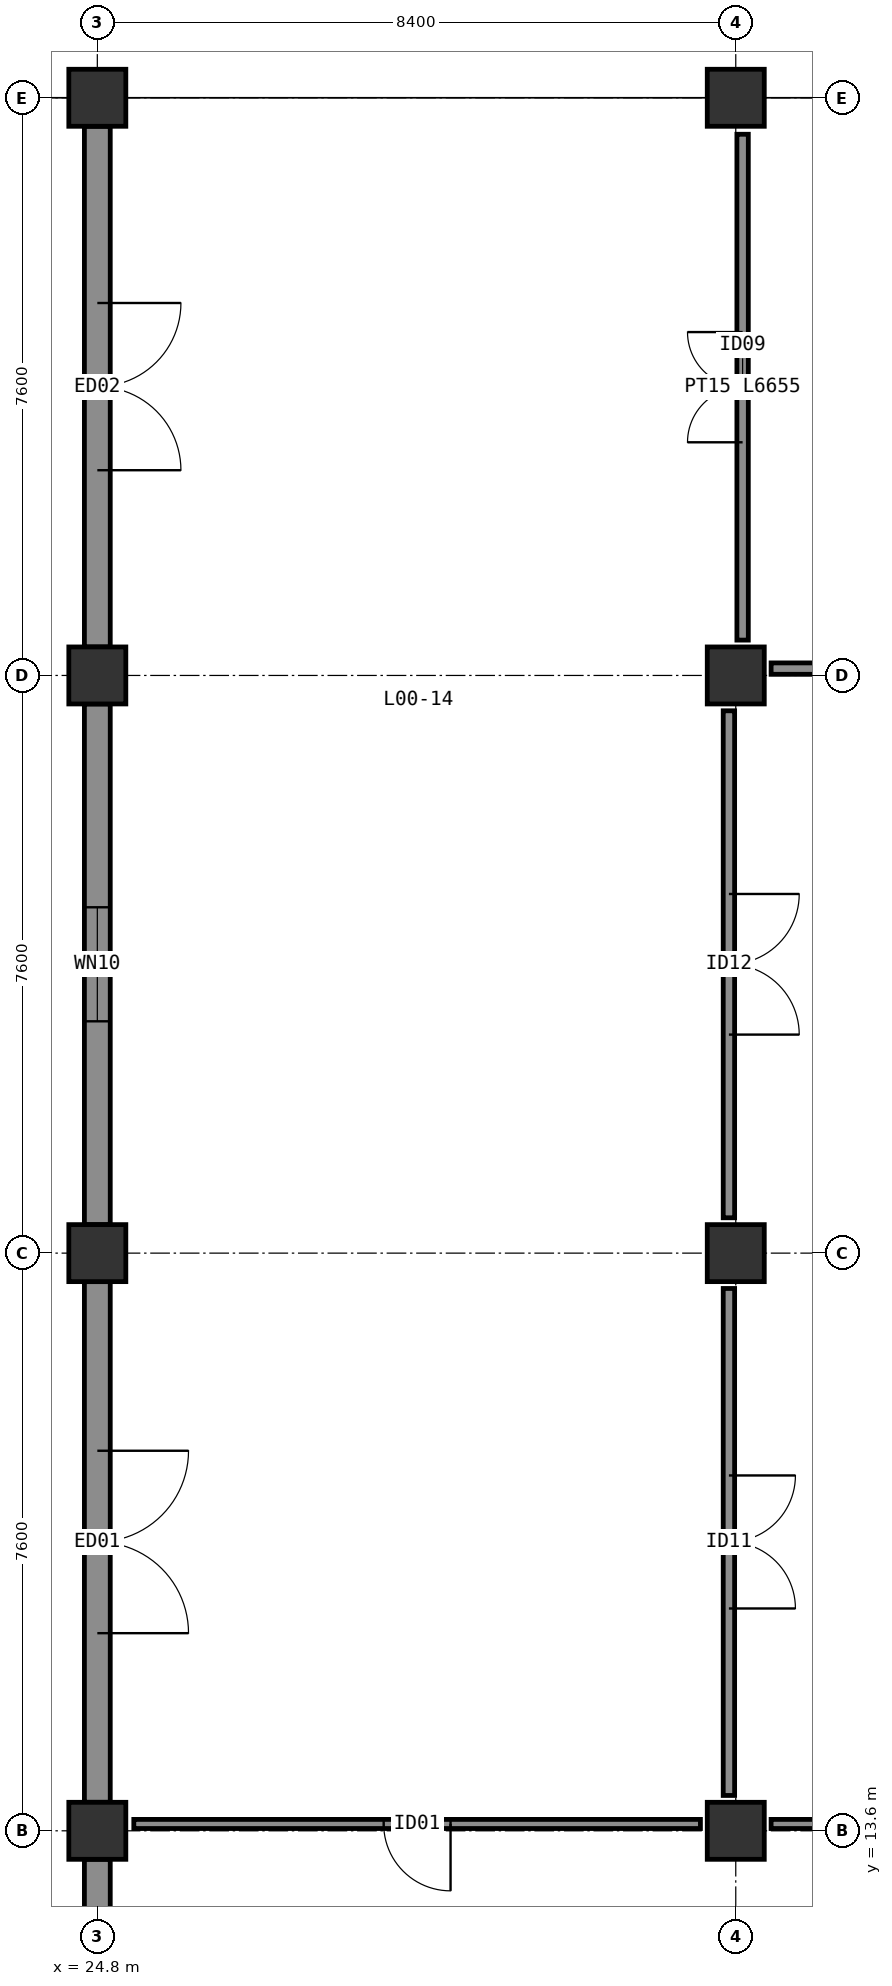
"""IFC4 building model, lengths in metres.
Left out: names, types, materials, properties, quantities, classifications, styles, units other than length and angle.
Written with IfcOpenShell. Run it as: python <this file> out.ifc"""

import sys

from ifc_helpers import new_model, si_unit, direction, frame, frame_2d, origin, origin_2d, place, context, subcontext, project, spatial, rectangle, extrude, element, fill, save


model = new_model("IFC4")
c1 = context("Model", 3, precision=1e-05, world=origin(), true_north=direction((0.0, 1.0)))
c2 = subcontext(c1, "Body", "Model", "MODEL_VIEW")
j1 = project(units=[si_unit("LENGTHUNIT", "METRE"), si_unit("PLANEANGLEUNIT", "RADIAN")], contexts=[c1])
p1 = place(None, origin())
s1 = spatial("IfcSite", under=j1, at=p1, CompositionType="ELEMENT")
p2 = place(p1, origin())
s2 = spatial("IfcBuilding", under=s1, at=p2, CompositionType="ELEMENT")
p3 = place(p2, origin())
s3 = spatial("IfcBuildingStorey", under=s2, at=p3, CompositionType="ELEMENT", Elevation=0.0)
for number, where, z_axis, x_axis in (
    (1, (24.8, 13.6, 0.0), (0.0, 0.0, 1.0), (1.0, 0.0, 0.0)),
    (2, (33.2, 13.6, 0.0), (0.0, 0.0, 1.0), (1.0, 0.0, 0.0)),
    (3, (24.8, 21.2, 0.0), (0.0, 0.0, 1.0), (1.0, 0.0, 0.0)),
    (4, (33.2, 21.2, 0.0), (0.0, 0.0, 1.0), (1.0, 0.0, 0.0)),
    (5, (24.8, 28.8, 0.0), (0.0, 0.0, 1.0), (1.0, 0.0, 0.0)),
    (6, (33.2, 28.8, 0.0), (0.0, 0.0, 1.0), (1.0, 0.0, 0.0)),
    (7, (24.8, 36.4, 0.0), (0.0, 0.0, 1.0), (1.0, 0.0, 0.0)),
    (8, (33.2, 36.4, 0.0), (0.0, 0.0, 1.0), (1.0, 0.0, 0.0)),
):
    element("IfcColumn", number, at=place(p3, frame(where, z_axis=z_axis, x_axis=x_axis)), inside=s3, PredefinedType="COLUMN", context=c2, shape_type="SweptSolid", body=[
        extrude(rectangle(XDim=0.75, YDim=0.75, at=origin_2d()), origin(), (0.0, 0.0, 1.0), 4.8),
    ])
p4 = place(p3, frame((24.8, 36.025, 0.0), z_axis=(0.0, 0.0, 1.0), x_axis=(0.0, -1.0, 0.0)))
e9 = element("IfcWall", 9, at=p4, inside=s3, PredefinedType="SOLIDWALL", context=c2, shape_type="SweptSolid", body=[
    extrude(rectangle(XDim=6.85, YDim=0.34, at=frame_2d((3.425, 0.0))), origin(), (0.0, 0.0, 1.0), 4.5),
])
p5 = place(p4, frame((2.325, 0.0, 0.0)))
e10 = element("IfcOpeningElement", 10, at=p5, cuts=e9, PredefinedType="OPENING", context=c2, shape_type="SweptSolid", body=[
    extrude(rectangle(XDim=2.2, YDim=2.4, at=frame_2d((1.1, 1.2))), frame((0.0, 0.18, 0.0), z_axis=(0.0, -1.0, 0.0), x_axis=(1.0, 0.0, 0.0)), (0.0, 0.0, 1.0), 0.36),
])
p6 = place(p3, frame((24.8, 28.425, 0.0), z_axis=(0.0, 0.0, 1.0), x_axis=(0.0, -1.0, 0.0)))
e11 = element("IfcWall", 11, at=p6, inside=s3, PredefinedType="SOLIDWALL", context=c2, shape_type="SweptSolid", body=[
    extrude(rectangle(XDim=6.85, YDim=0.34, at=frame_2d((3.425, 0.0))), origin(), (0.0, 0.0, 1.0), 4.5),
])
p7 = place(p6, frame((2.675, 0.0, 0.95)))
e12 = element("IfcOpeningElement", 12, at=p7, cuts=e11, PredefinedType="OPENING", context=c2, shape_type="SweptSolid", body=[
    extrude(rectangle(XDim=1.5, YDim=1.8, at=frame_2d((0.75, 0.9))), frame((0.0, 0.18, 0.0), z_axis=(0.0, -1.0, 0.0), x_axis=(1.0, 0.0, 0.0)), (0.0, 0.0, 1.0), 0.36),
])
p8 = place(p3, frame((24.8, 20.825, 0.0), z_axis=(0.0, 0.0, 1.0), x_axis=(0.0, -1.0, 0.0)))
e13 = element("IfcWall", 13, at=p8, inside=s3, PredefinedType="SOLIDWALL", context=c2, shape_type="SweptSolid", body=[
    extrude(rectangle(XDim=6.85, YDim=0.34, at=frame_2d((3.425, 0.0))), origin(), (0.0, 0.0, 1.0), 4.5),
])
p9 = place(p8, frame((2.225, 0.0, 0.0)))
e14 = element("IfcOpeningElement", 14, at=p9, cuts=e13, PredefinedType="OPENING", context=c2, shape_type="SweptSolid", body=[
    extrude(rectangle(XDim=2.4, YDim=2.4, at=frame_2d((1.2, 1.2))), frame((0.0, 0.18, 0.0), z_axis=(0.0, -1.0, 0.0), x_axis=(1.0, 0.0, 0.0)), (0.0, 0.0, 1.0), 0.36),
])
p10 = place(p3, frame((24.8, 13.225, 0.0), z_axis=(0.0, 0.0, 1.0), x_axis=(0.0, -1.0, 0.0)))
e15 = element("IfcWall", 15, at=p10, inside=s3, PredefinedType="SOLIDWALL", context=c2, shape_type="SweptSolid", body=[
    extrude(rectangle(XDim=6.775, YDim=0.34, at=frame_2d((3.388, 0.0))), origin(), (0.0, 0.0, 1.0), 4.5),
])
p11 = place(p10, frame((2.387, 0.0, 0.0)))
e16 = element("IfcOpeningElement", 16, at=p11, cuts=e15, PredefinedType="OPENING", context=c2, shape_type="SweptSolid", body=[
    extrude(rectangle(XDim=2.0, YDim=2.1, at=frame_2d((1.0, 1.05))), frame((0.0, 0.18, 0.0), z_axis=(0.0, -1.0, 0.0), x_axis=(1.0, 0.0, 0.0)), (0.0, 0.0, 1.0), 0.36),
])
p12 = place(p3, frame((33.29, 29.265, 0.0), z_axis=(0.0, 0.0, 1.0), x_axis=(0.0, 1.0, 0.0)))
e17 = element("IfcWall", 17, at=p12, inside=s3, PredefinedType="PARTITIONING", context=c2, shape_type="SweptSolid", body=[
    extrude(rectangle(XDim=6.655, YDim=0.15, at=frame_2d((3.328, 0.0))), origin(), (0.0, 0.0, 1.0), 4.5),
])
p13 = place(p12, frame((2.603, 0.0, 0.0)))
e18 = element("IfcOpeningElement", 18, at=p13, cuts=e17, PredefinedType="OPENING", context=c2, shape_type="SweptSolid", body=[
    extrude(rectangle(XDim=1.45, YDim=2.18, at=frame_2d((0.725, 1.09))), frame((0.0, 0.085, 0.0), z_axis=(0.0, -1.0, 0.0), x_axis=(1.0, 0.0, 0.0)), (0.0, 0.0, 1.0), 0.17),
])
p14 = place(p3, frame((33.11, 20.735, 0.0), z_axis=(0.0, 0.0, 1.0), x_axis=(0.0, -1.0, 0.0)))
e19 = element("IfcWall", 19, at=p14, inside=s3, PredefinedType="PARTITIONING", context=c2, shape_type="SweptSolid", body=[
    extrude(rectangle(XDim=6.67, YDim=0.15, at=frame_2d((3.335, 0.0))), origin(), (0.0, 0.0, 1.0), 3.81),
])
p15 = place(p14, frame((2.46, 0.0, 0.0)))
e20 = element("IfcOpeningElement", 20, at=p15, cuts=e19, PredefinedType="OPENING", context=c2, shape_type="SweptSolid", body=[
    extrude(rectangle(XDim=1.75, YDim=2.22, at=frame_2d((0.875, 1.11))), frame((0.0, 0.085, 0.0), z_axis=(0.0, -1.0, 0.0), x_axis=(1.0, 0.0, 0.0)), (0.0, 0.0, 1.0), 0.17),
])
p16 = place(p3, frame((33.11, 28.335, 0.0), z_axis=(0.0, 0.0, 1.0), x_axis=(0.0, -1.0, 0.0)))
e21 = element("IfcWall", 21, at=p16, inside=s3, PredefinedType="PARTITIONING", context=c2, shape_type="SweptSolid", body=[
    extrude(rectangle(XDim=6.67, YDim=0.15, at=frame_2d((3.335, 0.0))), origin(), (0.0, 0.0, 1.0), 3.81),
])
p17 = place(p16, frame((2.41, 0.0, 0.0)))
e22 = element("IfcOpeningElement", 22, at=p17, cuts=e21, PredefinedType="OPENING", context=c2, shape_type="SweptSolid", body=[
    extrude(rectangle(XDim=1.85, YDim=2.22, at=frame_2d((0.925, 1.11))), frame((0.0, 0.085, 0.0), z_axis=(0.0, -1.0, 0.0), x_axis=(1.0, 0.0, 0.0)), (0.0, 0.0, 1.0), 0.17),
])
p18 = place(p3, frame((32.735, 13.69, 0.0), z_axis=(0.0, 0.0, 1.0), x_axis=(-1.0, 0.0, 0.0)))
e23 = element("IfcWall", 23, at=p18, inside=s3, PredefinedType="PARTITIONING", context=c2, shape_type="SweptSolid", body=[
    extrude(rectangle(XDim=7.455, YDim=0.12, at=frame_2d((3.728, 0.0))), origin(), (0.0, 0.0, 1.0), 4.5),
])
p19 = place(p18, frame((3.288, 0.0, 0.0)))
e24 = element("IfcOpeningElement", 24, at=p19, cuts=e23, PredefinedType="OPENING", context=c2, shape_type="SweptSolid", body=[
    extrude(rectangle(XDim=0.88, YDim=2.08, at=frame_2d((0.44, 1.04))), frame((0.0, 0.07, 0.0), z_axis=(0.0, -1.0, 0.0), x_axis=(1.0, 0.0, 0.0)), (0.0, 0.0, 1.0), 0.14),
])
p20 = place(p3, frame((41.135, 28.89, 0.0), z_axis=(0.0, 0.0, 1.0), x_axis=(-1.0, 0.0, 0.0)))
e25 = element("IfcWall", 25, at=p20, inside=s3, PredefinedType="PARTITIONING", context=c2, shape_type="SweptSolid", body=[
    extrude(rectangle(XDim=7.47, YDim=0.15, at=frame_2d((3.735, 0.0))), origin(), (0.0, 0.0, 1.0), 4.047),
])
p21 = place(p20, frame((3.06, 0.0, 0.0)))
e26 = element("IfcOpeningElement", 26, at=p21, cuts=e25, PredefinedType="OPENING", context=c2, shape_type="SweptSolid", body=[
    extrude(rectangle(XDim=1.35, YDim=2.18, at=frame_2d((0.675, 1.09))), frame((0.0, 0.085, 0.0), z_axis=(0.0, -1.0, 0.0), x_axis=(1.0, 0.0, 0.0)), (0.0, 0.0, 1.0), 0.17),
])
p22 = place(p3, frame((41.135, 13.69, 0.0), z_axis=(0.0, 0.0, 1.0), x_axis=(-1.0, 0.0, 0.0)))
e27 = element("IfcWall", 27, at=p22, inside=s3, PredefinedType="PARTITIONING", context=c2, shape_type="SweptSolid", body=[
    extrude(rectangle(XDim=7.47, YDim=0.12, at=frame_2d((3.735, 0.0))), origin(), (0.0, 0.0, 1.0), 3.81),
])
p23 = place(p22, frame((2.91, 0.0, 0.0)))
e28 = element("IfcOpeningElement", 28, at=p23, cuts=e27, PredefinedType="OPENING", context=c2, shape_type="SweptSolid", body=[
    extrude(rectangle(XDim=1.65, YDim=2.18, at=frame_2d((0.825, 1.09))), frame((0.0, 0.07, 0.0), z_axis=(0.0, -1.0, 0.0), x_axis=(1.0, 0.0, 0.0)), (0.0, 0.0, 1.0), 0.14),
])
p24 = place(p5, frame((2.2, 0.0, 0.0), z_axis=(0.0, 0.0, 1.0), x_axis=(-1.0, 0.0, 0.0)))
e29 = element("IfcDoor", 29, at=p24, inside=s3, OperationType="DOUBLE_DOOR_SINGLE_SWING", PredefinedType="DOOR", context=c2, shape_type="SweptSolid", body=[
    extrude(rectangle(XDim=2.2, YDim=2.4, at=frame_2d((1.1, 1.2))), frame((0.0, 0.025, 0.0), z_axis=(0.0, -1.0, 0.0), x_axis=(1.0, 0.0, 0.0)), (0.0, 0.0, 1.0), 0.05),
])
fill(e10, e29)
p25 = place(p7, origin())
e30 = element("IfcWindow", 30, at=p25, inside=s3, PartitioningType="SINGLE_PANEL", PredefinedType="WINDOW", context=c2, shape_type="SweptSolid", body=[
    extrude(rectangle(XDim=1.5, YDim=1.8, at=frame_2d((0.75, 0.9))), frame((0.0, 0.03, 0.0), z_axis=(0.0, -1.0, 0.0), x_axis=(1.0, 0.0, 0.0)), (0.0, 0.0, 1.0), 0.06),
])
fill(e12, e30)
p26 = place(p9, frame((2.4, 0.0, 0.0), z_axis=(0.0, 0.0, 1.0), x_axis=(-1.0, 0.0, 0.0)))
e31 = element("IfcDoor", 31, at=p26, inside=s3, OperationType="DOUBLE_DOOR_SINGLE_SWING", PredefinedType="DOOR", context=c2, shape_type="SweptSolid", body=[
    extrude(rectangle(XDim=2.4, YDim=2.4, at=frame_2d((1.2, 1.2))), frame((0.0, 0.025, 0.0), z_axis=(0.0, -1.0, 0.0), x_axis=(1.0, 0.0, 0.0)), (0.0, 0.0, 1.0), 0.05),
])
fill(e14, e31)
p27 = place(p13, origin())
e32 = element("IfcDoor", 32, at=p27, inside=s3, OperationType="DOUBLE_DOOR_SINGLE_SWING", PredefinedType="DOOR", context=c2, shape_type="SweptSolid", body=[
    extrude(rectangle(XDim=1.45, YDim=2.18, at=frame_2d((0.725, 1.09))), frame((0.0, 0.025, 0.0), z_axis=(0.0, -1.0, 0.0), x_axis=(1.0, 0.0, 0.0)), (0.0, 0.0, 1.0), 0.05),
])
fill(e18, e32)
p28 = place(p15, origin())
e33 = element("IfcDoor", 33, at=p28, inside=s3, OperationType="DOUBLE_DOOR_SINGLE_SWING", PredefinedType="DOOR", context=c2, shape_type="SweptSolid", body=[
    extrude(rectangle(XDim=1.75, YDim=2.22, at=frame_2d((0.875, 1.11))), frame((0.0, 0.025, 0.0), z_axis=(0.0, -1.0, 0.0), x_axis=(1.0, 0.0, 0.0)), (0.0, 0.0, 1.0), 0.05),
])
fill(e20, e33)
p29 = place(p17, origin())
e34 = element("IfcDoor", 34, at=p29, inside=s3, OperationType="DOUBLE_DOOR_SINGLE_SWING", PredefinedType="DOOR", context=c2, shape_type="SweptSolid", body=[
    extrude(rectangle(XDim=1.85, YDim=2.22, at=frame_2d((0.925, 1.11))), frame((0.0, 0.025, 0.0), z_axis=(0.0, -1.0, 0.0), x_axis=(1.0, 0.0, 0.0)), (0.0, 0.0, 1.0), 0.05),
])
fill(e22, e34)
p30 = place(p19, origin())
e35 = element("IfcDoor", 35, at=p30, inside=s3, OperationType="SINGLE_SWING_LEFT", PredefinedType="DOOR", context=c2, shape_type="SweptSolid", body=[
    extrude(rectangle(XDim=0.88, YDim=2.08, at=frame_2d((0.44, 1.04))), frame((0.0, 0.025, 0.0), z_axis=(0.0, -1.0, 0.0), x_axis=(1.0, 0.0, 0.0)), (0.0, 0.0, 1.0), 0.05),
])
fill(e24, e35)
save(model, sys.argv[1])
